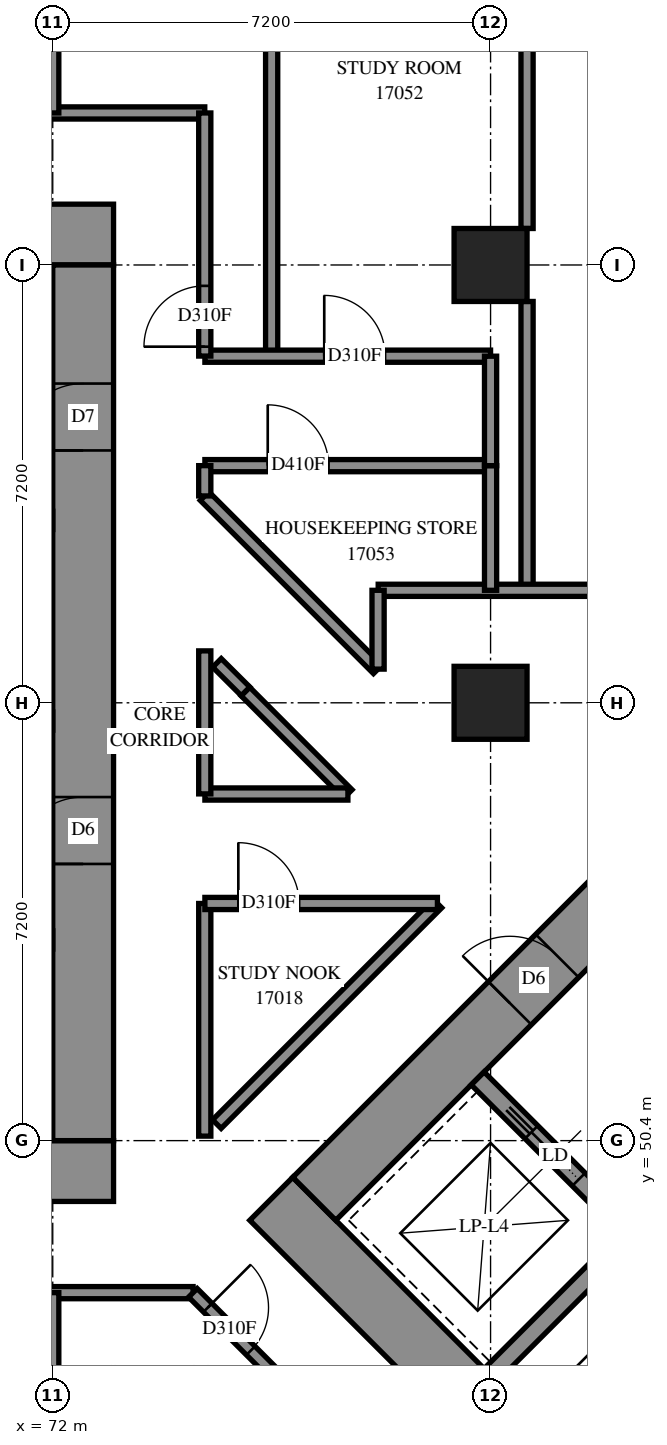
"""IFC4 building model, lengths in metres.
Left out: names, types, materials, properties, quantities, classifications, styles, units other than length and angle.
Written with IfcOpenShell. Run it as: python <this file> out.ifc"""

import sys

from ifc_helpers import new_model, si_unit, direction, frame, frame_2d, origin, origin_2d, place, context, subcontext, project, spatial, rectangle, extrude, element, fill, save


model = new_model("IFC4")
c1 = context("Model", 3, precision=1e-05, world=origin(), true_north=direction((0.0, 1.0)))
c2 = subcontext(c1, "Body", "Model", "MODEL_VIEW")
j1 = project(units=[si_unit("LENGTHUNIT", "METRE"), si_unit("PLANEANGLEUNIT", "RADIAN")], contexts=[c1])
p1 = place(None, origin())
s1 = spatial("IfcSite", under=j1, at=p1, CompositionType="ELEMENT")
p2 = place(p1, origin())
s2 = spatial("IfcBuilding", under=s1, at=p2, CompositionType="ELEMENT")
p3 = place(p2, frame((0.0, 0.0, 64.4)))
s3 = spatial("IfcBuildingStorey", under=s2, at=p3, CompositionType="ELEMENT", Elevation=64.4)
for number, where, z_axis, x_axis in (
    (1, (79.2, 57.6, 0.0), (0.0, 0.0, 1.0), (1.0, 0.0, 0.0)),
    (2, (79.2, 64.8, 0.0), (0.0, 0.0, 1.0), (1.0, 0.0, 0.0)),
):
    element("IfcColumn", number, at=place(p3, frame(where, z_axis=z_axis, x_axis=x_axis)), inside=s3, PredefinedType="COLUMN", context=c2, shape_type="SweptSolid", body=[
        extrude(rectangle(XDim=1.2, YDim=1.2, at=origin_2d()), origin(), (0.0, 0.0, 1.0), 3.1),
    ])
p4 = place(p3, frame((56.6, 49.9, -0.3), z_axis=(0.0, 0.0, 1.0), x_axis=(1.0, 0.0, 0.0)))
e3 = element("IfcWall", 3, at=p4, inside=s3, PredefinedType="SHEAR", context=c2, shape_type="SweptSolid", body=[
    extrude(rectangle(XDim=16.4, YDim=1.0, at=frame_2d((8.2, 0.0))), origin(), (0.0, 0.0, 1.0), 2.7),
])
p5 = place(p3, frame((56.6, 65.3, -0.3), z_axis=(0.0, 0.0, 1.0), x_axis=(1.0, 0.0, 0.0)))
e4 = element("IfcWall", 4, at=p5, inside=s3, PredefinedType="SHEAR", context=c2, shape_type="SweptSolid", body=[
    extrude(rectangle(XDim=16.4, YDim=1.0, at=frame_2d((8.2, 0.0))), origin(), (0.0, 0.0, 1.0), 2.7),
])
p6 = place(p5, frame((11.0, 0.0, 0.3)))
e5 = element("IfcOpeningElement", 5, at=p6, cuts=e4, PredefinedType="OPENING", context=c2, shape_type="SweptSolid", body=[
    extrude(rectangle(XDim=0.8, YDim=2.1, at=frame_2d((0.4, 1.05))), frame((0.0, 0.51, 0.0), z_axis=(0.0, -1.0, 0.0), x_axis=(1.0, 0.0, 0.0)), (0.0, 0.0, 1.0), 1.02),
])
p7 = place(p3, frame((72.5, 50.4, -0.3), z_axis=(0.0, 0.0, 1.0), x_axis=(0.0, 1.0, 0.0)))
e6 = element("IfcWall", 6, at=p7, inside=s3, PredefinedType="SHEAR", context=c2, shape_type="SweptSolid", body=[
    extrude(rectangle(XDim=14.4, YDim=1.0, at=frame_2d((7.2, 0.0))), origin(), (0.0, 0.0, 1.0), 2.7),
])
p8 = place(p7, frame((4.55, 0.0, 0.3)))
e7 = element("IfcOpeningElement", 7, at=p8, cuts=e6, PredefinedType="OPENING", context=c2, shape_type="SweptSolid", body=[
    extrude(rectangle(XDim=1.1, YDim=2.1, at=frame_2d((0.55, 1.05))), frame((0.0, 0.51, 0.0), z_axis=(0.0, -1.0, 0.0), x_axis=(1.0, 0.0, 0.0)), (0.0, 0.0, 1.0), 1.02),
])
p9 = place(p7, frame((11.35, 0.0, 0.3)))
e8 = element("IfcOpeningElement", 8, at=p9, cuts=e6, PredefinedType="OPENING", context=c2, shape_type="SweptSolid", body=[
    extrude(rectangle(XDim=1.1, YDim=2.1, at=frame_2d((0.55, 1.05))), frame((0.0, 0.51, 0.0), z_axis=(0.0, -1.0, 0.0), x_axis=(1.0, 0.0, 0.0)), (0.0, 0.0, 1.0), 1.02),
])
p10 = place(p3, frame((75.594, 49.443, -0.3), z_axis=(0.0, 0.0, 1.0), x_axis=(0.7071037324, -0.70710983, 0.0)))
e9 = element("IfcWall", 9, at=p10, inside=s3, PredefinedType="SHEAR", context=c2, shape_type="SweptSolid", body=[
    extrude(rectangle(XDim=16.4, YDim=1.0, at=frame_2d((8.2, 0.0))), origin(), (0.0, 0.0, 1.0), 2.7),
])
p11 = place(p3, frame((76.301, 49.443, -0.3), z_axis=(0.0, 0.0, 1.0), x_axis=(0.7071067812, 0.7071067812, 0.0)))
e10 = element("IfcWall", 10, at=p11, inside=s3, PredefinedType="SHEAR", context=c2, shape_type="SweptSolid", body=[
    extrude(rectangle(XDim=14.4, YDim=1.0, at=frame_2d((7.2, 0.0))), origin(), (0.0, 0.0, 1.0), 2.7),
])
p12 = place(p11, frame((4.55, 0.0, 0.3)))
e11 = element("IfcOpeningElement", 11, at=p12, cuts=e10, PredefinedType="OPENING", context=c2, shape_type="SweptSolid", body=[
    extrude(rectangle(XDim=1.1, YDim=2.1, at=frame_2d((0.55, 1.05))), frame((0.0, 0.51, 0.0), z_axis=(0.0, -1.0, 0.0), x_axis=(1.0, 0.0, 0.0)), (0.0, 0.0, 1.0), 1.02),
])
p13 = place(p11, frame((11.35, 0.0, 0.3)))
e12 = element("IfcOpeningElement", 12, at=p13, cuts=e10, PredefinedType="OPENING", context=c2, shape_type="SweptSolid", body=[
    extrude(rectangle(XDim=1.1, YDim=2.1, at=frame_2d((0.55, 1.05))), frame((0.0, 0.51, 0.0), z_axis=(0.0, -1.0, 0.0), x_axis=(1.0, 0.0, 0.0)), (0.0, 0.0, 1.0), 1.02),
])
p14 = place(p3, frame((79.2, 46.544, 0.0), z_axis=(0.0, 0.0, 1.0), x_axis=(0.7071219326, 0.7070916295, 0.0)))
e13 = element("IfcWall", 13, at=p14, inside=s3, PredefinedType="SOLIDWALL", context=c2, shape_type="SweptSolid", body=[
    extrude(rectangle(XDim=3.3, YDim=0.3, at=frame_2d((1.65, 0.0))), origin(), (0.0, 0.0, 1.0), 3.1),
])
p15 = place(p3, frame((78.988, 51.423, 0.0), z_axis=(0.0, 0.0, 1.0), x_axis=(0.7071067812, -0.7071067812, 0.0)))
e14 = element("IfcWall", 14, at=p15, inside=s3, PredefinedType="SOLIDWALL", context=c2, shape_type="SweptSolid", body=[
    extrude(rectangle(XDim=14.4, YDim=0.3, at=frame_2d((7.2, 0.0))), origin(), (0.0, 0.0, 1.0), 3.1),
])
p16 = place(p15, frame((1.25, 0.0, 0.0)))
e15 = element("IfcOpeningElement", 15, at=p16, cuts=e14, PredefinedType="OPENING", context=c2, shape_type="SweptSolid", body=[
    extrude(rectangle(XDim=1.1, YDim=2.1, at=frame_2d((0.55, 1.05))), frame((0.0, 0.16, 0.0), z_axis=(0.0, -1.0, 0.0), x_axis=(1.0, 0.0, 0.0)), (0.0, 0.0, 1.0), 0.32),
])
p17 = place(p15, frame((4.85, 0.0, 0.0)))
e16 = element("IfcOpeningElement", 16, at=p17, cuts=e14, PredefinedType="OPENING", context=c2, shape_type="SweptSolid", body=[
    extrude(rectangle(XDim=1.1, YDim=2.1, at=frame_2d((0.55, 1.05))), frame((0.0, 0.16, 0.0), z_axis=(0.0, -1.0, 0.0), x_axis=(1.0, 0.0, 0.0)), (0.0, 0.0, 1.0), 0.32),
])
p18 = place(p15, frame((8.45, 0.0, 0.0)))
e17 = element("IfcOpeningElement", 17, at=p18, cuts=e14, PredefinedType="OPENING", context=c2, shape_type="SweptSolid", body=[
    extrude(rectangle(XDim=1.1, YDim=2.1, at=frame_2d((0.55, 1.05))), frame((0.0, 0.16, 0.0), z_axis=(0.0, -1.0, 0.0), x_axis=(1.0, 0.0, 0.0)), (0.0, 0.0, 1.0), 0.32),
])
p19 = place(p15, frame((12.05, 0.0, 0.0)))
e18 = element("IfcOpeningElement", 18, at=p19, cuts=e14, PredefinedType="OPENING", context=c2, shape_type="SweptSolid", body=[
    extrude(rectangle(XDim=1.1, YDim=2.1, at=frame_2d((0.55, 1.05))), frame((0.0, 0.16, 0.0), z_axis=(0.0, -1.0, 0.0), x_axis=(1.0, 0.0, 0.0)), (0.0, 0.0, 1.0), 0.32),
])
p20 = place(p3, frame((55.1, 67.3, 0.0), z_axis=(0.0, 0.0, 1.0), x_axis=(1.0, 0.0, 0.0)))
e19 = element("IfcWall", 19, at=p20, inside=s3, PredefinedType="PARTITIONING", context=c2, shape_type="SweptSolid", body=[
    extrude(rectangle(XDim=19.4, YDim=0.2, at=frame_2d((9.7, 0.0))), origin(), (0.0, 0.0, 1.0), 3.1),
])
p21 = place(p20, frame((6.361, 0.0, 0.0)))
e20 = element("IfcOpeningElement", 20, at=p21, cuts=e19, PredefinedType="OPENING", context=c2, shape_type="SweptSolid", body=[
    extrude(rectangle(XDim=0.9, YDim=2.1, at=frame_2d((0.45, 1.05))), frame((0.0, 0.11, 0.0), z_axis=(0.0, -1.0, 0.0), x_axis=(1.0, 0.0, 0.0)), (0.0, 0.0, 1.0), 0.22),
])
p22 = place(p20, frame((13.561, 0.0, 0.0)))
e21 = element("IfcOpeningElement", 21, at=p22, cuts=e19, PredefinedType="OPENING", context=c2, shape_type="SweptSolid", body=[
    extrude(rectangle(XDim=0.9, YDim=2.1, at=frame_2d((0.45, 1.05))), frame((0.0, 0.11, 0.0), z_axis=(0.0, -1.0, 0.0), x_axis=(1.0, 0.0, 0.0)), (0.0, 0.0, 1.0), 0.22),
])
p23 = place(p3, frame((55.1, 47.9, 0.0), z_axis=(0.0, 0.0, 1.0), x_axis=(1.0, 0.0, 0.0)))
e22 = element("IfcWall", 22, at=p23, inside=s3, PredefinedType="PARTITIONING", context=c2, shape_type="SweptSolid", body=[
    extrude(rectangle(XDim=19.208, YDim=0.2, at=frame_2d((9.604, 0.0))), origin(), (0.0, 0.0, 1.0), 3.1),
])
p24 = place(p23, frame((6.399, 0.0, 0.0)))
e23 = element("IfcOpeningElement", 23, at=p24, cuts=e22, PredefinedType="OPENING", context=c2, shape_type="SweptSolid", body=[
    extrude(rectangle(XDim=0.9, YDim=2.1, at=frame_2d((0.45, 1.05))), frame((0.0, 0.11, 0.0), z_axis=(0.0, -1.0, 0.0), x_axis=(1.0, 0.0, 0.0)), (0.0, 0.0, 1.0), 0.22),
])
p25 = place(p23, frame((13.561, 0.0, 0.0)))
e24 = element("IfcOpeningElement", 24, at=p25, cuts=e22, PredefinedType="OPENING", context=c2, shape_type="SweptSolid", body=[
    extrude(rectangle(XDim=0.9, YDim=2.1, at=frame_2d((0.45, 1.05))), frame((0.0, 0.11, 0.0), z_axis=(0.0, -1.0, 0.0), x_axis=(1.0, 0.0, 0.0)), (0.0, 0.0, 1.0), 0.22),
])
p26 = place(p3, frame((75.6, 63.3, 0.0), z_axis=(0.0, 0.0, 1.0), x_axis=(0.0, 1.0, 0.0)))
e25 = element("IfcWall", 25, at=p26, inside=s3, PredefinedType="PARTITIONING", context=c2, shape_type="SweptSolid", body=[
    extrude(rectangle(XDim=9.473, YDim=0.2, at=frame_2d((4.737, 0.0))), origin(), (0.0, 0.0, 1.0), 3.1),
])
p27 = place(p3, frame((79.8, 65.4, 0.0), z_axis=(0.0, 0.0, 1.0), x_axis=(0.0, 1.0, 0.0)))
e26 = element("IfcWall", 26, at=p27, inside=s3, PredefinedType="PARTITIONING", context=c2, shape_type="SweptSolid", body=[
    extrude(rectangle(XDim=6.0, YDim=0.2, at=frame_2d((3.0, 0.0))), origin(), (0.0, 0.0, 1.0), 3.1),
])
p28 = place(p3, frame((74.699, 50.671, 0.0), z_axis=(0.0, 0.0, 1.0), x_axis=(0.7071067812, 0.7071067812, 0.0)))
e27 = element("IfcWall", 27, at=p28, inside=s3, PredefinedType="PARTITIONING", context=c2, shape_type="SweptSolid", body=[
    extrude(rectangle(XDim=5.131, YDim=0.2, at=frame_2d((2.565, 0.0))), origin(), (0.0, 0.0, 1.0), 3.1),
])
p29 = place(p3, frame((79.8, 59.45, 0.0), z_axis=(0.0, 0.0, 1.0), x_axis=(0.0, 1.0, 0.0)))
e28 = element("IfcWall", 28, at=p29, inside=s3, PredefinedType="PARTITIONING", context=c2, shape_type="SweptSolid", body=[
    extrude(rectangle(XDim=4.75, YDim=0.2, at=frame_2d((2.375, 0.0))), origin(), (0.0, 0.0, 1.0), 3.1),
])
p30 = place(p3, frame((74.502, 63.3, 0.0), z_axis=(0.0, 0.0, 1.0), x_axis=(1.0, 0.0, 0.0)))
e29 = element("IfcWall", 29, at=p30, inside=s3, PredefinedType="PARTITIONING", context=c2, shape_type="SweptSolid", body=[
    extrude(rectangle(XDim=4.698, YDim=0.2, at=frame_2d((2.349, 0.0))), origin(), (0.0, 0.0, 1.0), 3.1),
])
p31 = place(p30, frame((1.963, 0.0, 0.0)))
e30 = element("IfcOpeningElement", 30, at=p31, cuts=e29, PredefinedType="OPENING", context=c2, shape_type="SweptSolid", body=[
    extrude(rectangle(XDim=1.0, YDim=2.1, at=frame_2d((0.5, 1.05))), frame((0.0, 0.11, 0.0), z_axis=(0.0, -1.0, 0.0), x_axis=(1.0, 0.0, 0.0)), (0.0, 0.0, 1.0), 0.22),
])
p32 = place(p3, frame((74.502, 61.5, 0.0), z_axis=(0.0, 0.0, 1.0), x_axis=(1.0, 0.0, 0.0)))
e31 = element("IfcWall", 31, at=p32, inside=s3, PredefinedType="PARTITIONING", context=c2, shape_type="SweptSolid", body=[
    extrude(rectangle(XDim=4.698, YDim=0.2, at=frame_2d((2.349, 0.0))), origin(), (0.0, 0.0, 1.0), 3.1),
])
p33 = place(p32, frame((1.034, 0.0, 0.0)))
e32 = element("IfcOpeningElement", 32, at=p33, cuts=e31, PredefinedType="OPENING", context=c2, shape_type="SweptSolid", body=[
    extrude(rectangle(XDim=1.0, YDim=2.1, at=frame_2d((0.5, 1.05))), frame((0.0, 0.11, 0.0), z_axis=(0.0, -1.0, 0.0), x_axis=(1.0, 0.0, 0.0)), (0.0, 0.0, 1.0), 0.22),
])
p34 = place(p3, frame((74.305, 47.897, 0.0), z_axis=(0.0, 0.0, 1.0), x_axis=(0.7071067812, -0.7071067812, 0.0)))
e33 = element("IfcWall", 33, at=p34, inside=s3, PredefinedType="PARTITIONING", context=c2, shape_type="SweptSolid", body=[
    extrude(rectangle(XDim=4.302, YDim=0.2, at=frame_2d((2.151, 0.0))), origin(), (0.0, 0.0, 1.0), 3.1),
])
p35 = place(p34, frame((0.345, 0.0, 0.0)))
e34 = element("IfcOpeningElement", 34, at=p35, cuts=e33, PredefinedType="OPENING", context=c2, shape_type="SweptSolid", body=[
    extrude(rectangle(XDim=1.0, YDim=2.1, at=frame_2d((0.5, 1.05))), frame((0.0, 0.11, 0.0), z_axis=(0.0, -1.0, 0.0), x_axis=(1.0, 0.0, 0.0)), (0.0, 0.0, 1.0), 0.22),
])
for number, where, z_axis, x_axis in (
    (35, (72.0, 67.3, 0.0), (0.0, 0.0, 1.0), (0.0, 1.0, 0.0)),
    (36, (72.0, 43.8, 0.0), (0.0, 0.0, 1.0), (0.0, 1.0, 0.0)),
):
    element("IfcWall", number, at=place(p3, frame(where, z_axis=z_axis, x_axis=x_axis)), inside=s3, PredefinedType="PARTITIONING", context=c2, shape_type="SweptSolid", body=[
        extrude(rectangle(XDim=4.1, YDim=0.2, at=frame_2d((2.05, 0.0))), origin(), (0.0, 0.0, 1.0), 3.1),
    ])
p36 = place(p3, frame((74.497, 60.999, 0.0), z_axis=(0.0, 0.0, 1.0), x_axis=(0.7071067812, -0.7071067812, 0.0)))
e37 = element("IfcWall", 37, at=p36, inside=s3, PredefinedType="PARTITIONING", context=c2, shape_type="SweptSolid", body=[
    extrude(rectangle(XDim=4.028, YDim=0.2, at=frame_2d((2.014, 0.0))), origin(), (0.0, 0.0, 1.0), 3.1),
])
p37 = place(p3, frame((74.5, 63.302, 0.0), z_axis=(0.0, 0.0, 1.0), x_axis=(0.0, 1.0, 0.0)))
e38 = element("IfcWall", 38, at=p37, inside=s3, PredefinedType="PARTITIONING", context=c2, shape_type="SweptSolid", body=[
    extrude(rectangle(XDim=3.998, YDim=0.2, at=frame_2d((1.999, 0.0))), origin(), (0.0, 0.0, 1.0), 3.1),
])
p38 = place(p37, frame((0.154, 0.0, 0.0)))
e39 = element("IfcOpeningElement", 39, at=p38, cuts=e38, PredefinedType="OPENING", context=c2, shape_type="SweptSolid", body=[
    extrude(rectangle(XDim=1.0, YDim=2.1, at=frame_2d((0.5, 1.05))), frame((0.0, 0.11, 0.0), z_axis=(0.0, -1.0, 0.0), x_axis=(1.0, 0.0, 0.0)), (0.0, 0.0, 1.0), 0.22),
])
p39 = place(p3, frame((74.5, 50.474, 0.0), z_axis=(0.0, 0.0, 1.0), x_axis=(0.0, 1.0, 0.0)))
e40 = element("IfcWall", 40, at=p39, inside=s3, PredefinedType="PARTITIONING", context=c2, shape_type="SweptSolid", body=[
    extrude(rectangle(XDim=3.826, YDim=0.2, at=frame_2d((1.913, 0.0))), origin(), (0.0, 0.0, 1.0), 3.1),
])
p40 = place(p3, frame((74.502, 54.3, 0.0), z_axis=(0.0, 0.0, 1.0), x_axis=(1.0, 0.0, 0.0)))
e41 = element("IfcWall", 41, at=p40, inside=s3, PredefinedType="PARTITIONING", context=c2, shape_type="SweptSolid", body=[
    extrude(rectangle(XDim=3.824, YDim=0.2, at=frame_2d((1.912, 0.0))), origin(), (0.0, 0.0, 1.0), 3.1),
])
p41 = place(p40, frame((0.55, 0.0, 0.0)))
e42 = element("IfcOpeningElement", 42, at=p41, cuts=e41, PredefinedType="OPENING", context=c2, shape_type="SweptSolid", body=[
    extrude(rectangle(XDim=1.0, YDim=2.1, at=frame_2d((0.5, 1.05))), frame((0.0, 0.11, 0.0), z_axis=(0.0, -1.0, 0.0), x_axis=(1.0, 0.0, 0.0)), (0.0, 0.0, 1.0), 0.22),
])
p42 = place(p3, frame((77.352, 59.45, 0.0), z_axis=(0.0, 0.0, 1.0), x_axis=(1.0, 0.0, 0.0)))
e43 = element("IfcWall", 43, at=p42, inside=s3, PredefinedType="PARTITIONING", context=c2, shape_type="SweptSolid", body=[
    extrude(rectangle(XDim=3.698, YDim=0.2, at=frame_2d((1.849, 0.0))), origin(), (0.0, 0.0, 1.0), 3.1),
])
p43 = place(p3, frame((75.168, 57.786, 0.0), z_axis=(0.0, 0.0, 1.0), x_axis=(0.7066870088, -0.7075263045, 0.0)))
e44 = element("IfcWall", 44, at=p43, inside=s3, PredefinedType="PARTITIONING", context=c2, shape_type="SweptSolid", body=[
    extrude(rectangle(XDim=2.383, YDim=0.2, at=frame_2d((1.192, 0.0))), origin(), (0.0, 0.0, 1.0), 3.1),
])
for number, where, z_axis, x_axis in (
    (45, (74.502, 56.1, 0.0), (0.0, 0.0, 1.0), (1.0, 0.0, 0.0)),
    (46, (74.5, 56.102, 0.0), (0.0, 0.0, 1.0), (0.0, 1.0, 0.0)),
):
    element("IfcWall", number, at=place(p3, frame(where, z_axis=z_axis, x_axis=x_axis)), inside=s3, PredefinedType="PARTITIONING", context=c2, shape_type="SweptSolid", body=[
        extrude(rectangle(XDim=2.352, YDim=0.2, at=frame_2d((1.176, 0.0))), origin(), (0.0, 0.0, 1.0), 3.1),
    ])
p44 = place(p3, frame((79.2, 59.45, 0.0), z_axis=(0.0, 0.0, 1.0), x_axis=(0.0, 1.0, 0.0)))
e47 = element("IfcWall", 47, at=p44, inside=s3, PredefinedType="PARTITIONING", context=c2, shape_type="SweptSolid", body=[
    extrude(rectangle(XDim=2.05, YDim=0.2, at=frame_2d((1.025, 0.0))), origin(), (0.0, 0.0, 1.0), 3.1),
])
p45 = place(p3, frame((79.2, 61.5, 0.0), z_axis=(0.0, 0.0, 1.0), x_axis=(0.0, 1.0, 0.0)))
e48 = element("IfcWall", 48, at=p45, inside=s3, PredefinedType="PARTITIONING", context=c2, shape_type="SweptSolid", body=[
    extrude(rectangle(XDim=1.8, YDim=0.2, at=frame_2d((0.9, 0.0))), origin(), (0.0, 0.0, 1.0), 3.1),
])
p46 = place(p3, frame((77.35, 58.154, 0.0), z_axis=(0.0, 0.0, 1.0), x_axis=(0.0, 1.0, 0.0)))
e49 = element("IfcWall", 49, at=p46, inside=s3, PredefinedType="PARTITIONING", context=c2, shape_type="SweptSolid", body=[
    extrude(rectangle(XDim=1.296, YDim=0.2, at=frame_2d((0.648, 0.0))), origin(), (0.0, 0.0, 1.0), 3.1),
])
p47 = place(p3, frame((74.701, 58.257, 0.0), z_axis=(0.0, 0.0, 1.0), x_axis=(0.7086128608, -0.7055974869, 0.0)))
e50 = element("IfcWall", 50, at=p47, inside=s3, PredefinedType="PARTITIONING", context=c2, shape_type="SweptSolid", body=[
    extrude(rectangle(XDim=0.663, YDim=0.2, at=frame_2d((0.332, 0.0))), origin(), (0.0, 0.0, 1.0), 3.1),
])
p48 = place(p3, frame((74.5, 61.002, 0.0), z_axis=(0.0, 0.0, 1.0), x_axis=(0.0, 1.0, 0.0)))
e51 = element("IfcWall", 51, at=p48, inside=s3, PredefinedType="PARTITIONING", context=c2, shape_type="SweptSolid", body=[
    extrude(rectangle(XDim=0.498, YDim=0.2, at=frame_2d((0.249, 0.0))), origin(), (0.0, 0.0, 1.0), 3.1),
])
p49 = place(p8, origin())
e52 = element("IfcDoor", 52, at=p49, inside=s3, OperationType="DOUBLE_DOOR_SINGLE_SWING", PredefinedType="DOOR", context=c2, shape_type="SweptSolid", body=[
    extrude(rectangle(XDim=1.1, YDim=2.1, at=frame_2d((0.55, 1.05))), frame((0.0, 0.025, 0.0), z_axis=(0.0, -1.0, 0.0), x_axis=(1.0, 0.0, 0.0)), (0.0, 0.0, 1.0), 0.05),
])
fill(e7, e52)
p50 = place(p9, origin())
e53 = element("IfcDoor", 53, at=p50, inside=s3, OperationType="SINGLE_SWING_RIGHT", PredefinedType="DOOR", context=c2, shape_type="SweptSolid", body=[
    extrude(rectangle(XDim=1.1, YDim=2.1, at=frame_2d((0.55, 1.05))), frame((0.0, 0.025, 0.0), z_axis=(0.0, -1.0, 0.0), x_axis=(1.0, 0.0, 0.0)), (0.0, 0.0, 1.0), 0.05),
])
fill(e8, e53)
p51 = place(p12, origin())
e54 = element("IfcDoor", 54, at=p51, inside=s3, OperationType="DOUBLE_DOOR_SINGLE_SWING", PredefinedType="DOOR", context=c2, shape_type="SweptSolid", body=[
    extrude(rectangle(XDim=1.1, YDim=2.1, at=frame_2d((0.55, 1.05))), frame((0.0, 0.025, 0.0), z_axis=(0.0, -1.0, 0.0), x_axis=(1.0, 0.0, 0.0)), (0.0, 0.0, 1.0), 0.05),
])
fill(e11, e54)
p52 = place(p16, origin())
e55 = element("IfcDoor", 55, at=p52, inside=s3, OperationType="SLIDING_TO_LEFT", PredefinedType="DOOR", context=c2, shape_type="SweptSolid", body=[
    extrude(rectangle(XDim=1.1, YDim=2.1, at=frame_2d((0.55, 1.05))), frame((0.0, 0.025, 0.0), z_axis=(0.0, -1.0, 0.0), x_axis=(1.0, 0.0, 0.0)), (0.0, 0.0, 1.0), 0.05),
])
fill(e15, e55)
p53 = place(p41, origin())
e56 = element("IfcDoor", 56, at=p53, inside=s3, OperationType="SINGLE_SWING_RIGHT", PredefinedType="DOOR", context=c2, shape_type="SweptSolid", body=[
    extrude(rectangle(XDim=1.0, YDim=2.1, at=frame_2d((0.5, 1.05))), frame((0.0, 0.025, 0.0), z_axis=(0.0, -1.0, 0.0), x_axis=(1.0, 0.0, 0.0)), (0.0, 0.0, 1.0), 0.05),
])
fill(e42, e56)
p54 = place(p38, origin())
e57 = element("IfcDoor", 57, at=p54, inside=s3, OperationType="SINGLE_SWING_RIGHT", PredefinedType="DOOR", context=c2, shape_type="SweptSolid", body=[
    extrude(rectangle(XDim=1.0, YDim=2.1, at=frame_2d((0.5, 1.05))), frame((0.0, 0.025, 0.0), z_axis=(0.0, -1.0, 0.0), x_axis=(1.0, 0.0, 0.0)), (0.0, 0.0, 1.0), 0.05),
])
fill(e39, e57)
p55 = place(p35, origin())
e58 = element("IfcDoor", 58, at=p55, inside=s3, OperationType="SINGLE_SWING_LEFT", PredefinedType="DOOR", context=c2, shape_type="SweptSolid", body=[
    extrude(rectangle(XDim=1.0, YDim=2.1, at=frame_2d((0.5, 1.05))), frame((0.0, 0.025, 0.0), z_axis=(0.0, -1.0, 0.0), x_axis=(1.0, 0.0, 0.0)), (0.0, 0.0, 1.0), 0.05),
])
fill(e34, e58)
p56 = place(p31, origin())
e59 = element("IfcDoor", 59, at=p56, inside=s3, OperationType="SINGLE_SWING_LEFT", PredefinedType="DOOR", context=c2, shape_type="SweptSolid", body=[
    extrude(rectangle(XDim=1.0, YDim=2.1, at=frame_2d((0.5, 1.05))), frame((0.0, 0.025, 0.0), z_axis=(0.0, -1.0, 0.0), x_axis=(1.0, 0.0, 0.0)), (0.0, 0.0, 1.0), 0.05),
])
fill(e30, e59)
p57 = place(p33, origin())
e60 = element("IfcDoor", 60, at=p57, inside=s3, OperationType="SINGLE_SWING_RIGHT", PredefinedType="DOOR", context=c2, shape_type="SweptSolid", body=[
    extrude(rectangle(XDim=1.0, YDim=2.1, at=frame_2d((0.5, 1.05))), frame((0.0, 0.025, 0.0), z_axis=(0.0, -1.0, 0.0), x_axis=(1.0, 0.0, 0.0)), (0.0, 0.0, 1.0), 0.05),
])
fill(e32, e60)
save(model, sys.argv[1])
